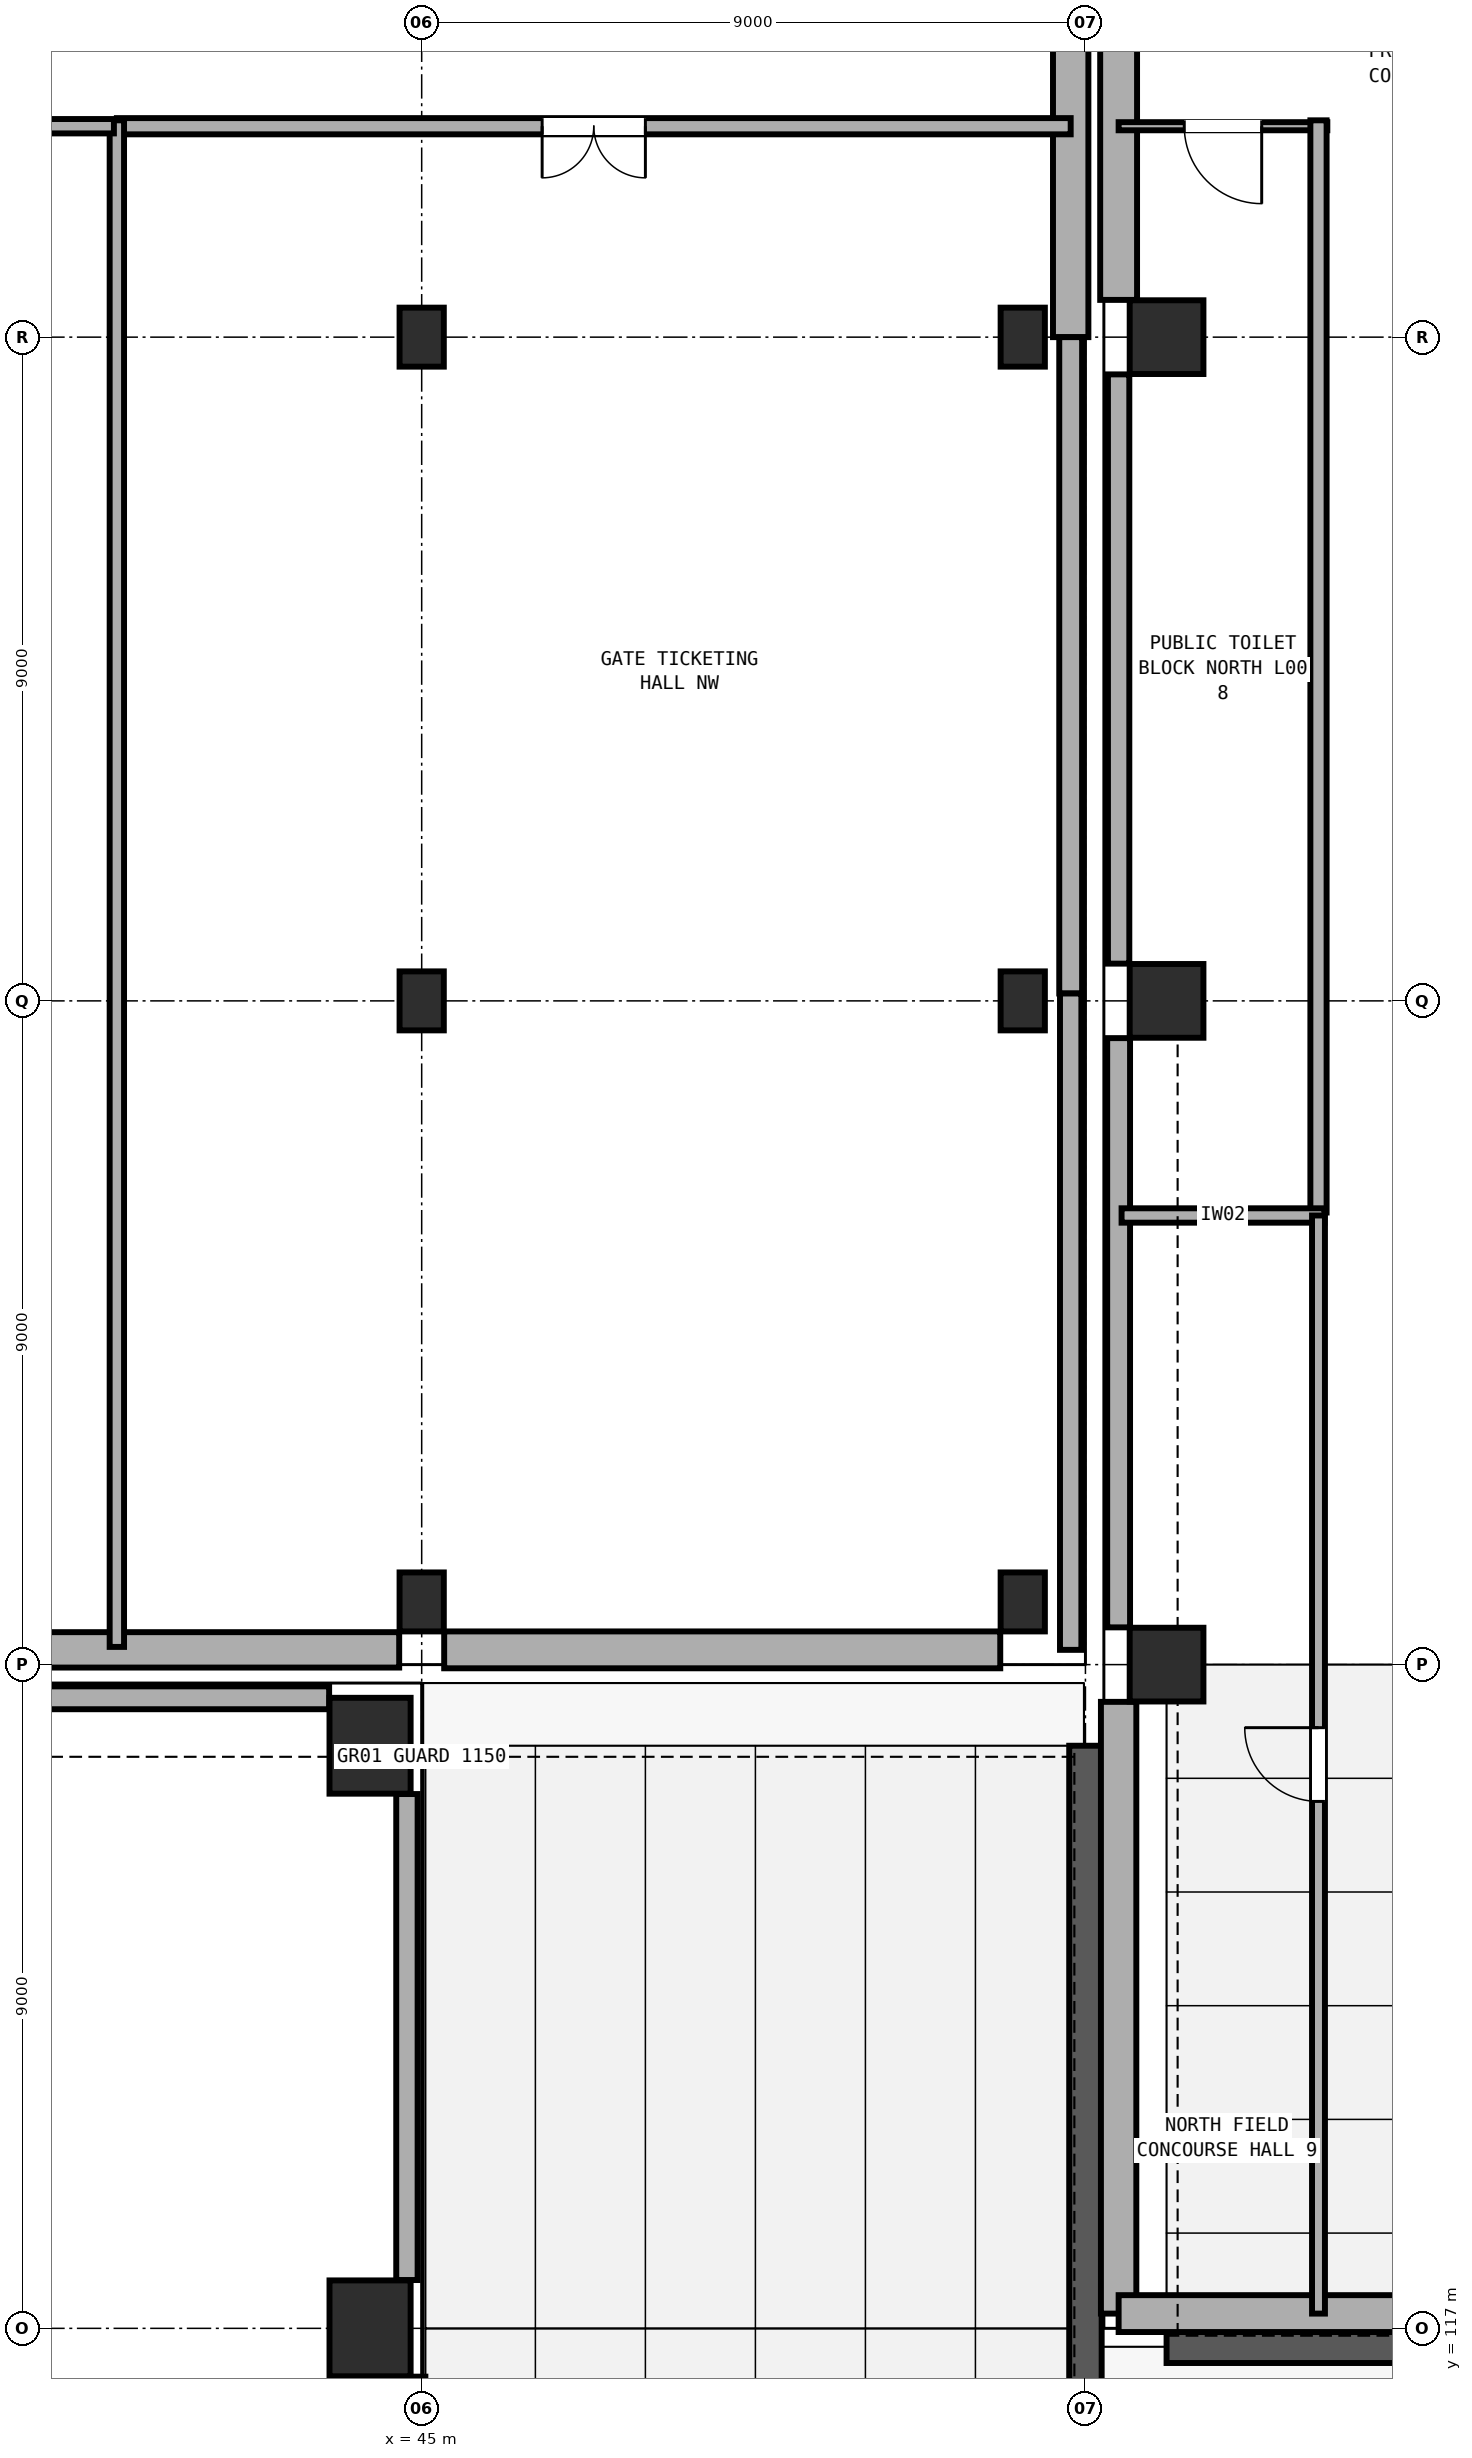
"""IFC4 building model, lengths in metres.
Left out: names, types, materials, properties, quantities, classifications, styles, units other than length and angle.
Written with IfcOpenShell. Run it as: python <this file> out.ifc"""

import sys

from ifc_helpers import new_model, si_unit, direction, frame, frame_2d, origin, origin_2d, place, context, subcontext, project, spatial, rectangle, extrude, element, fill, save


model = new_model("IFC4")
c1 = context("Model", 3, precision=1e-05, world=origin(), true_north=direction((0.0, 1.0)))
c2 = subcontext(c1, "Body", "Model", "MODEL_VIEW")
j1 = project(units=[si_unit("LENGTHUNIT", "METRE"), si_unit("PLANEANGLEUNIT", "RADIAN")], contexts=[c1])
p1 = place(None, origin())
s1 = spatial("IfcSite", under=j1, at=p1, CompositionType="ELEMENT")
p2 = place(p1, origin())
s2 = spatial("IfcBuilding", under=s1, at=p2, CompositionType="ELEMENT")
p3 = place(p2, origin())
s3 = spatial("IfcBuildingStorey", under=s2, at=p3, CompositionType="ELEMENT", Elevation=0.0)
for number, where, z_axis, x_axis in (
    (1, (44.3, 117.0, 0.0), (0.0, 0.0, 1.0), (1.0, 0.0, 0.0)),
    (2, (44.3, 124.9, 0.0), (0.0, 0.0, 1.0), (1.0, 0.0, 0.0)),
):
    element("IfcColumn", number, at=place(p3, frame(where, z_axis=z_axis, x_axis=x_axis)), inside=s3, PredefinedType="COLUMN", context=c2, shape_type="SweptSolid", body=[
        extrude(rectangle(XDim=1.1, YDim=1.3, at=origin_2d()), origin(), (0.0, 0.0, 1.0), 4.8),
    ])
for number, where, z_axis, x_axis in (
    (3, (55.1, 126.0, 0.0), (0.0, 0.0, 1.0), (1.0, 0.0, 0.0)),
    (4, (55.1, 135.0, 0.0), (0.0, 0.0, 1.0), (1.0, 0.0, 0.0)),
    (5, (55.1, 144.0, 0.0), (0.0, 0.0, 1.0), (1.0, 0.0, 0.0)),
):
    element("IfcColumn", number, at=place(p3, frame(where, z_axis=z_axis, x_axis=x_axis)), inside=s3, PredefinedType="COLUMN", context=c2, shape_type="SweptSolid", body=[
        extrude(rectangle(XDim=1.0, YDim=1.0, at=origin_2d()), origin(), (0.0, 0.0, 1.0), 4.8),
    ])
for number, where, z_axis, x_axis in (
    (6, (45.0, 126.85, 0.0), (0.0, 0.0, 1.0), (1.0, 0.0, 0.0)),
    (7, (45.0, 135.0, 0.0), (0.0, 0.0, 1.0), (1.0, 0.0, 0.0)),
    (8, (45.0, 144.0, 0.0), (0.0, 0.0, 1.0), (1.0, 0.0, 0.0)),
    (9, (53.15, 126.85, 0.0), (0.0, 0.0, 1.0), (1.0, 0.0, 0.0)),
    (10, (53.15, 135.0, 0.0), (0.0, 0.0, 1.0), (1.0, 0.0, 0.0)),
    (11, (53.15, 144.0, 0.0), (0.0, 0.0, 1.0), (1.0, 0.0, 0.0)),
):
    element("IfcColumn", number, at=place(p3, frame(where, z_axis=z_axis, x_axis=x_axis)), inside=s3, PredefinedType="COLUMN", context=c2, shape_type="SweptSolid", body=[
        extrude(rectangle(XDim=0.6, YDim=0.8, at=origin_2d()), origin(), (0.0, 0.0, 1.0), 4.8),
    ])
p4 = place(p3, frame((54.0, 37.1, 0.0), z_axis=(0.0, 0.0, 1.0), x_axis=(0.0, 1.0, 0.0)))
e12 = element("IfcWall", 12, at=p4, inside=s3, PredefinedType="SOLIDWALL", context=c2, shape_type="SweptSolid", body=[
    extrude(rectangle(XDim=87.8, YDim=0.44, at=frame_2d((43.9, 0.0))), origin(), (0.0, 0.0, 1.0), 0.9),
])
p5 = place(p3, frame((160.9, 116.75, 0.0), z_axis=(0.0, 0.0, 1.0), x_axis=(-1.0, 0.0, 0.0)))
e13 = element("IfcWall", 13, at=p5, inside=s3, PredefinedType="SOLIDWALL", context=c2, shape_type="SweptSolid", body=[
    extrude(rectangle(XDim=105.8, YDim=0.44, at=frame_2d((52.9, 0.0))), origin(), (0.0, 0.0, 1.0), 0.9),
])
p6 = place(p3, frame((36.605, 125.55, 0.0), z_axis=(0.0, 0.0, 1.0), x_axis=(1.0, 0.0, 0.0)))
e14 = element("IfcWall", 14, at=p6, inside=s3, PredefinedType="SOLIDWALL", context=c2, shape_type="SweptSolid", body=[
    extrude(rectangle(XDim=7.14, YDim=0.31, at=frame_2d((3.57, 0.0))), origin(), (0.0, 0.0, 1.0), 3.28),
])
p7 = place(p3, frame((44.8, 124.245, 0.0), z_axis=(0.0, 0.0, 1.0), x_axis=(0.0, -1.0, 0.0)))
e15 = element("IfcWall", 15, at=p7, inside=s3, PredefinedType="SOLIDWALL", context=c2, shape_type="SweptSolid", body=[
    extrude(rectangle(XDim=6.59, YDim=0.29, at=frame_2d((3.295, 0.0))), origin(), (0.0, 0.0, 1.0), 3.28),
])
p8 = place(p3, frame((44.8, 116.345, 0.0), z_axis=(0.0, 0.0, 1.0), x_axis=(0.0, -1.0, 0.0)))
e16 = element("IfcWall", 16, at=p8, inside=s3, PredefinedType="SOLIDWALL", context=c2, shape_type="SweptSolid", body=[
    extrude(rectangle(XDim=5.89, YDim=0.5, at=frame_2d((2.945, 0.0))), origin(), (0.0, 0.0, 1.0), 3.28),
])
p9 = place(p3, frame((54.45, 117.2, 0.0), z_axis=(0.0, 0.0, 1.0), x_axis=(0.0, 1.0, 0.0)))
e17 = element("IfcWall", 17, at=p9, inside=s3, PredefinedType="SOLIDWALL", context=c2, shape_type="SweptSolid", body=[
    extrude(rectangle(XDim=8.295, YDim=0.48, at=frame_2d((4.147, 0.0))), origin(), (0.0, 0.0, 1.0), 3.28),
])
p10 = place(p3, frame((54.45, 126.505, 0.0), z_axis=(0.0, 0.0, 1.0), x_axis=(0.0, 1.0, 0.0)))
e18 = element("IfcWall", 18, at=p10, inside=s3, PredefinedType="SOLIDWALL", context=c2, shape_type="SweptSolid", body=[
    extrude(rectangle(XDim=7.99, YDim=0.31, at=frame_2d((3.995, 0.0))), origin(), (0.0, 0.0, 1.0), 3.28),
])
p11 = place(p3, frame((54.45, 135.505, 0.0), z_axis=(0.0, 0.0, 1.0), x_axis=(0.0, 1.0, 0.0)))
e19 = element("IfcWall", 19, at=p11, inside=s3, PredefinedType="SOLIDWALL", context=c2, shape_type="SweptSolid", body=[
    extrude(rectangle(XDim=7.99, YDim=0.29, at=frame_2d((3.995, 0.0))), origin(), (0.0, 0.0, 1.0), 3.28),
])
p12 = place(p3, frame((54.45, 144.505, 0.0), z_axis=(0.0, 0.0, 1.0), x_axis=(0.0, 1.0, 0.0)))
e20 = element("IfcWall", 20, at=p12, inside=s3, PredefinedType="SOLIDWALL", context=c2, shape_type="SweptSolid", body=[
    extrude(rectangle(XDim=7.99, YDim=0.5, at=frame_2d((3.995, 0.0))), origin(), (0.0, 0.0, 1.0), 3.28),
])
p13 = place(p3, frame((63.375, 117.2, 0.0), z_axis=(0.0, 0.0, 1.0), x_axis=(-1.0, 0.0, 0.0)))
e21 = element("IfcWall", 21, at=p13, inside=s3, PredefinedType="SOLIDWALL", context=c2, shape_type="SweptSolid", body=[
    extrude(rectangle(XDim=8.925, YDim=0.5, at=frame_2d((4.462, 0.0))), origin(), (0.0, 0.0, 1.0), 3.28),
])
p14 = place(p3, frame((53.8, 152.9, 0.0), z_axis=(0.0, 0.0, 1.0), x_axis=(0.0, -1.0, 0.0)))
e22 = element("IfcWall", 22, at=p14, inside=s3, PredefinedType="SOLIDWALL", context=c2, shape_type="SweptSolid", body=[
    extrude(rectangle(XDim=8.9, YDim=0.48, at=frame_2d((4.45, 0.0))), origin(), (0.0, 0.0, 1.0), 3.28),
])
p15 = place(p3, frame((53.8, 144.0, 0.0), z_axis=(0.0, 0.0, 1.0), x_axis=(0.0, -1.0, 0.0)))
e23 = element("IfcWall", 23, at=p15, inside=s3, PredefinedType="SOLIDWALL", context=c2, shape_type="SweptSolid", body=[
    extrude(rectangle(XDim=8.9, YDim=0.31, at=frame_2d((4.45, 0.0))), origin(), (0.0, 0.0, 1.0), 3.28),
])
p16 = place(p3, frame((53.8, 135.1, 0.0), z_axis=(0.0, 0.0, 1.0), x_axis=(0.0, -1.0, 0.0)))
e24 = element("IfcWall", 24, at=p16, inside=s3, PredefinedType="SOLIDWALL", context=c2, shape_type="SweptSolid", body=[
    extrude(rectangle(XDim=8.9, YDim=0.29, at=frame_2d((4.45, 0.0))), origin(), (0.0, 0.0, 1.0), 3.28),
])
p17 = place(p3, frame((52.845, 126.2, 0.0), z_axis=(0.0, 0.0, 1.0), x_axis=(-1.0, 0.0, 0.0)))
e25 = element("IfcWall", 25, at=p17, inside=s3, PredefinedType="SOLIDWALL", context=c2, shape_type="SweptSolid", body=[
    extrude(rectangle(XDim=7.54, YDim=0.5, at=frame_2d((3.77, 0.0))), origin(), (0.0, 0.0, 1.0), 3.28),
])
p18 = place(p3, frame((44.695, 126.2, 0.0), z_axis=(0.0, 0.0, 1.0), x_axis=(-1.0, 0.0, 0.0)))
e26 = element("IfcWall", 26, at=p18, inside=s3, PredefinedType="SOLIDWALL", context=c2, shape_type="SweptSolid", body=[
    extrude(rectangle(XDim=8.39, YDim=0.48, at=frame_2d((4.195, 0.0))), origin(), (0.0, 0.0, 1.0), 3.28),
])
p19 = place(p3, frame((57.28, 146.86, 0.0), z_axis=(0.0, 0.0, 1.0), x_axis=(-1.0, 0.0, 0.0)))
e27 = element("IfcWall", 27, at=p19, inside=s3, PredefinedType="PARTITIONING", context=c2, shape_type="SweptSolid", body=[
    extrude(rectangle(XDim=2.83, YDim=0.11, at=frame_2d((1.415, 0.0))), origin(), (0.0, 0.0, 1.0), 3.28),
])
p20 = place(p19, frame((0.89, 0.0, 0.0)))
e28 = element("IfcOpeningElement", 28, at=p20, cuts=e27, PredefinedType="OPENING", context=c2, shape_type="SweptSolid", body=[
    extrude(rectangle(XDim=1.05, YDim=2.1, at=frame_2d((0.525, 1.05))), frame((0.0, 0.065, 0.0), z_axis=(0.0, -1.0, 0.0), x_axis=(1.0, 0.0, 0.0)), (0.0, 0.0, 1.0), 0.13),
])
p21 = place(p3, frame((57.16, 146.94, 0.0), z_axis=(0.0, 0.0, 1.0), x_axis=(0.0, -1.0, 0.0)))
e29 = element("IfcWall", 29, at=p21, inside=s3, PredefinedType="PARTITIONING", context=c2, shape_type="SweptSolid", body=[
    extrude(rectangle(XDim=14.81, YDim=0.22, at=frame_2d((7.405, 0.0))), origin(), (0.0, 0.0, 1.0), 3.28),
])
p22 = place(p3, frame((57.24, 132.09, 0.0), z_axis=(0.0, 0.0, 1.0), x_axis=(-1.0, 0.0, 0.0)))
e30 = element("IfcWall", 30, at=p22, inside=s3, PredefinedType="PARTITIONING", context=c2, shape_type="SweptSolid", body=[
    extrude(rectangle(XDim=2.75, YDim=0.195, at=frame_2d((1.375, 0.0))), origin(), (0.0, 0.0, 1.0), 3.28),
])
p23 = place(p3, frame((57.16, 117.2, 0.0), z_axis=(0.0, 0.0, 1.0), x_axis=(0.0, 1.0, 0.0)))
e31 = element("IfcWall", 31, at=p23, inside=s3, PredefinedType="PARTITIONING", context=c2, shape_type="SweptSolid", body=[
    extrude(rectangle(XDim=14.89, YDim=0.175, at=frame_2d((7.445, 0.0))), origin(), (0.0, 0.0, 1.0), 3.28),
])
p24 = place(p23, frame((6.945, 0.0, 0.0)))
e32 = element("IfcOpeningElement", 32, at=p24, cuts=e31, PredefinedType="OPENING", context=c2, shape_type="SweptSolid", body=[
    extrude(rectangle(XDim=1.0, YDim=2.1, at=frame_2d((0.5, 1.05))), frame((0.0, 0.097, 0.0), z_axis=(0.0, -1.0, 0.0), x_axis=(1.0, 0.0, 0.0)), (0.0, 0.0, 1.0), 0.195),
])
p25 = place(p3, frame((53.8, 146.86, 0.0), z_axis=(0.0, 0.0, 1.0), x_axis=(-1.0, 0.0, 0.0)))
e33 = element("IfcWall", 33, at=p25, inside=s3, PredefinedType="PARTITIONING", context=c2, shape_type="SweptSolid", body=[
    extrude(rectangle(XDim=12.933, YDim=0.22, at=frame_2d((6.467, 0.0))), origin(), (0.0, 0.0, 1.0), 3.28),
])
p26 = place(p25, frame((5.767, 0.0, 0.0)))
e34 = element("IfcOpeningElement", 34, at=p26, cuts=e33, PredefinedType="OPENING", context=c2, shape_type="SweptSolid", body=[
    extrude(rectangle(XDim=1.4, YDim=2.15, at=frame_2d((0.7, 1.075))), frame((0.0, 0.12, 0.0), z_axis=(0.0, -1.0, 0.0), x_axis=(1.0, 0.0, 0.0)), (0.0, 0.0, 1.0), 0.24),
])
p27 = place(p3, frame((40.867, 126.24, 0.0), z_axis=(0.0, 0.0, 1.0), x_axis=(0.0, 1.0, 0.0)))
e35 = element("IfcWall", 35, at=p27, inside=s3, PredefinedType="PARTITIONING", context=c2, shape_type="SweptSolid", body=[
    extrude(rectangle(XDim=20.7, YDim=0.195, at=frame_2d((10.35, 0.0))), origin(), (0.0, 0.0, 1.0), 3.28),
])
p28 = place(p3, frame((32.66, 146.86, 0.0), z_axis=(0.0, 0.0, 1.0), x_axis=(1.0, 0.0, 0.0)))
e36 = element("IfcWall", 36, at=p28, inside=s3, PredefinedType="PARTITIONING", context=c2, shape_type="SweptSolid", body=[
    extrude(rectangle(XDim=8.167, YDim=0.195, at=frame_2d((4.083, 0.0))), origin(), (0.0, 0.0, 1.0), 3.28),
])
p29 = place(p20, origin())
e37 = element("IfcDoor", 37, at=p29, inside=s3, OperationType="SINGLE_SWING_LEFT", PredefinedType="DOOR", context=c2, shape_type="SweptSolid", body=[
    extrude(rectangle(XDim=1.05, YDim=2.1, at=frame_2d((0.525, 1.05))), frame((0.0, 0.025, 0.0), z_axis=(0.0, -1.0, 0.0), x_axis=(1.0, 0.0, 0.0)), (0.0, 0.0, 1.0), 0.05),
])
fill(e28, e37)
p30 = place(p24, origin())
e38 = element("IfcDoor", 38, at=p30, inside=s3, OperationType="SINGLE_SWING_RIGHT", PredefinedType="DOOR", context=c2, shape_type="SweptSolid", body=[
    extrude(rectangle(XDim=1.0, YDim=2.1, at=frame_2d((0.5, 1.05))), frame((0.0, 0.025, 0.0), z_axis=(0.0, -1.0, 0.0), x_axis=(1.0, 0.0, 0.0)), (0.0, 0.0, 1.0), 0.05),
])
fill(e32, e38)
p31 = place(p26, origin())
e39 = element("IfcDoor", 39, at=p31, inside=s3, OperationType="DOUBLE_DOOR_SINGLE_SWING", PredefinedType="DOOR", context=c2, shape_type="SweptSolid", body=[
    extrude(rectangle(XDim=1.4, YDim=2.15, at=frame_2d((0.7, 1.075))), frame((0.0, 0.025, 0.0), z_axis=(0.0, -1.0, 0.0), x_axis=(1.0, 0.0, 0.0)), (0.0, 0.0, 1.0), 0.05),
])
fill(e34, e39)
save(model, sys.argv[1])
